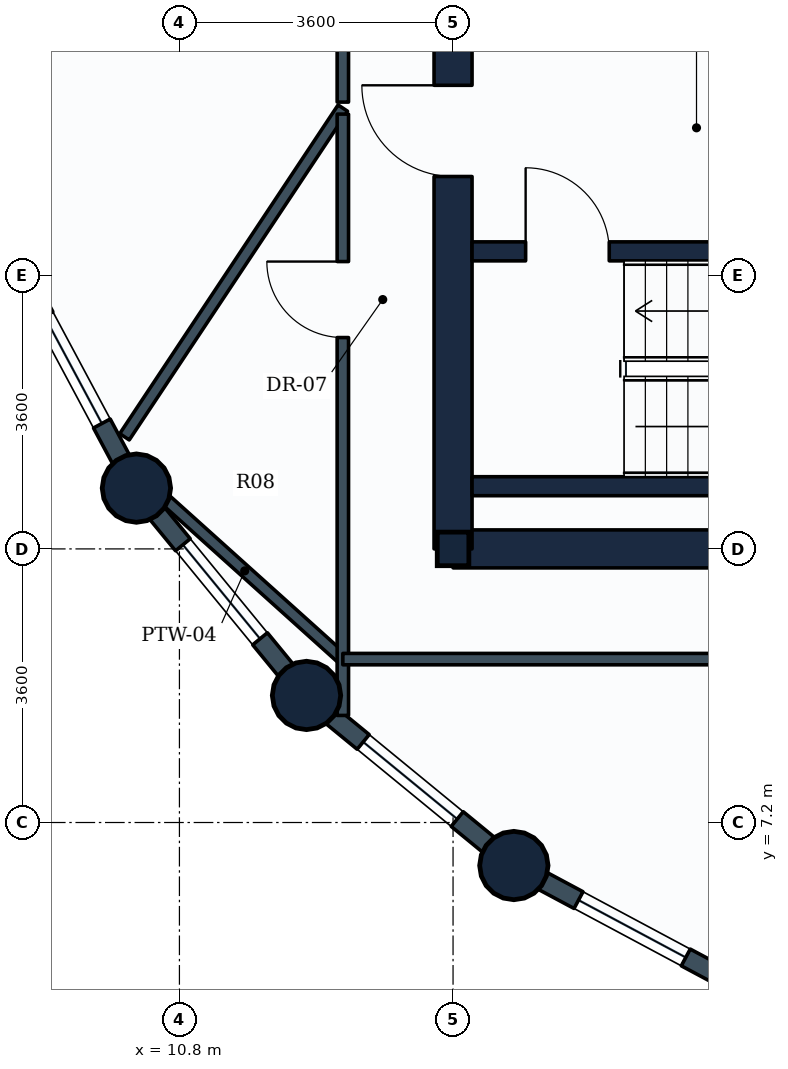
"""IFC4 building model, lengths in metres.
Left out: names, types, materials, properties, quantities, classifications, styles, units other than length and angle.
Written with IfcOpenShell. Run it as: python <this file> out.ifc"""

import sys

from ifc_helpers import new_model, si_unit, direction, frame, frame_2d, origin, origin_2d, place, context, subcontext, project, spatial, rectangle, circle, i_section, extrude, element, fill, save


model = new_model("IFC4")
c1 = context("Model", 3, precision=1e-05, world=origin(), true_north=direction((0.0, 1.0)))
c2 = subcontext(c1, "Body", "Model", "MODEL_VIEW")
j1 = project(units=[si_unit("LENGTHUNIT", "METRE"), si_unit("PLANEANGLEUNIT", "RADIAN")], contexts=[c1])
p1 = place(None, origin())
s1 = spatial("IfcSite", under=j1, at=p1, CompositionType="ELEMENT")
p2 = place(p1, origin())
s2 = spatial("IfcBuilding", under=s1, at=p2, CompositionType="ELEMENT")
p3 = place(p2, frame((0.0, 0.0, 201.4)))
s3 = spatial("IfcBuildingStorey", under=s2, at=p3, CompositionType="ELEMENT", Elevation=201.4)
for number, where, z_axis, x_axis in (
    (1, (10.234, 11.6, 0.0), (0.0, 0.0, 1.0), (1.0, 0.0, 0.0)),
    (2, (12.472, 8.872, 0.0), (0.0, 0.0, 1.0), (1.0, 0.0, 0.0)),
):
    element("IfcColumn", number, at=place(p3, frame(where, z_axis=z_axis, x_axis=x_axis)), inside=s3, PredefinedType="COLUMN", context=c2, shape_type="SweptSolid", body=[
        extrude(circle(Radius=0.45, at=origin_2d()), origin(), (0.0, 0.0, 1.0), 3.8),
    ])
p4 = place(p3, frame((14.4, 10.8, 0.0), z_axis=(0.0, 0.0, 1.0), x_axis=(1.0, 0.0, 0.0)))
e3 = element("IfcColumn", 3, at=p4, inside=s3, PredefinedType="COLUMN", context=c2, shape_type="SweptSolid", body=[
    extrude(i_section(OverallWidth=0.416, OverallDepth=0.442, WebThickness=0.025, FlangeThickness=0.041, FilletRadius=0.015, at=origin_2d()), origin(), (0.0, 0.0, 1.0), 3.8),
])
p5 = place(p3, frame((15.2, 6.634, 0.0), z_axis=(0.0, 0.0, 1.0), x_axis=(1.0, 0.0, 0.0)))
e4 = element("IfcColumn", 4, at=p5, inside=s3, PredefinedType="COLUMN", context=c2, shape_type="SweptSolid", body=[
    extrude(circle(Radius=0.45, at=origin_2d()), origin(), (0.0, 0.0, 1.0), 3.8),
])
p6 = place(p3, frame((10.234, 11.6, 0.0), z_axis=(0.0, 0.0, 1.0), x_axis=(-0.47151087309, 0.881860247748, 0.0)))
e5 = element("IfcWall", 5, at=p6, inside=s3, PredefinedType="STANDARD", context=c2, shape_type="SweptSolid", body=[
    extrude(rectangle(XDim=3.529, YDim=0.25, at=frame_2d((1.764, 0.0))), origin(), (0.0, 0.0, 1.0), 2.93),
])
p7 = place(p6, frame((0.964, 0.0, 0.85)))
e6 = element("IfcOpeningElement", 6, at=p7, cuts=e5, PredefinedType="OPENING", context=c2, shape_type="SweptSolid", body=[
    extrude(rectangle(XDim=1.6, YDim=1.35, at=frame_2d((0.8, 0.675))), frame((0.0, 0.135, 0.0), z_axis=(0.0, -1.0, 0.0), x_axis=(1.0, 0.0, 0.0)), (0.0, 0.0, 1.0), 0.27),
])
p8 = place(p3, frame((12.472, 8.872, 0.0), z_axis=(0.0, 0.0, 1.0), x_axis=(-0.634258295121, 0.773121216285, 0.0)))
e7 = element("IfcWall", 7, at=p8, inside=s3, PredefinedType="STANDARD", context=c2, shape_type="SweptSolid", body=[
    extrude(rectangle(XDim=3.529, YDim=0.25, at=frame_2d((1.764, 0.0))), origin(), (0.0, 0.0, 1.0), 2.93),
])
p9 = place(p8, frame((0.964, 0.0, 0.85)))
e8 = element("IfcOpeningElement", 8, at=p9, cuts=e7, PredefinedType="OPENING", context=c2, shape_type="SweptSolid", body=[
    extrude(rectangle(XDim=1.6, YDim=1.35, at=frame_2d((0.8, 0.675))), frame((0.0, 0.135, 0.0), z_axis=(0.0, -1.0, 0.0), x_axis=(1.0, 0.0, 0.0)), (0.0, 0.0, 1.0), 0.27),
])
p10 = place(p3, frame((15.2, 6.634, 0.0), z_axis=(0.0, 0.0, 1.0), x_axis=(-0.773121216285, 0.634258295121, 0.0)))
e9 = element("IfcWall", 9, at=p10, inside=s3, PredefinedType="STANDARD", context=c2, shape_type="SweptSolid", body=[
    extrude(rectangle(XDim=3.529, YDim=0.25, at=frame_2d((1.764, 0.0))), origin(), (0.0, 0.0, 1.0), 2.93),
])
p11 = place(p10, frame((0.964, 0.0, 0.85)))
e10 = element("IfcOpeningElement", 10, at=p11, cuts=e9, PredefinedType="OPENING", context=c2, shape_type="SweptSolid", body=[
    extrude(rectangle(XDim=1.6, YDim=1.35, at=frame_2d((0.8, 0.675))), frame((0.0, 0.135, 0.0), z_axis=(0.0, -1.0, 0.0), x_axis=(1.0, 0.0, 0.0)), (0.0, 0.0, 1.0), 0.27),
])
p12 = place(p3, frame((18.312, 4.97, 0.0), z_axis=(0.0, 0.0, 1.0), x_axis=(-0.881846862014, 0.471535907389, 0.0)))
e11 = element("IfcWall", 11, at=p12, inside=s3, PredefinedType="STANDARD", context=c2, shape_type="SweptSolid", body=[
    extrude(rectangle(XDim=3.529, YDim=0.25, at=frame_2d((1.765, 0.0))), origin(), (0.0, 0.0, 1.0), 2.93),
])
p13 = place(p12, frame((0.964, 0.0, 0.85)))
e12 = element("IfcOpeningElement", 12, at=p13, cuts=e11, PredefinedType="OPENING", context=c2, shape_type="SweptSolid", body=[
    extrude(rectangle(XDim=1.6, YDim=1.35, at=frame_2d((0.8, 0.675))), frame((0.0, 0.135, 0.0), z_axis=(0.0, -1.0, 0.0), x_axis=(1.0, 0.0, 0.0)), (0.0, 0.0, 1.0), 0.27),
])
p14 = place(p3, frame((14.4, 10.8, 0.0), z_axis=(0.0, 0.0, 1.0), x_axis=(1.0, 0.0, 0.0)))
e13 = element("IfcWall", 13, at=p14, inside=s3, PredefinedType="SHEAR", context=c2, shape_type="SweptSolid", body=[
    extrude(rectangle(XDim=18.0, YDim=0.5, at=frame_2d((9.0, 0.0))), origin(), (0.0, 0.0, 1.0), 3.55),
])
p15 = place(p3, frame((14.4, 10.8, 0.0), z_axis=(0.0, 0.0, 1.0), x_axis=(0.0, 1.0, 0.0)))
e14 = element("IfcWall", 14, at=p15, inside=s3, PredefinedType="SHEAR", context=c2, shape_type="SweptSolid", body=[
    extrude(rectangle(XDim=14.4, YDim=0.5, at=frame_2d((7.2, 0.0))), origin(), (0.0, 0.0, 1.0), 3.55),
])
p16 = place(p15, frame((11.05, 0.0, 0.0)))
e15 = element("IfcOpeningElement", 15, at=p16, cuts=e14, PredefinedType="OPENING", context=c2, shape_type="SweptSolid", body=[
    extrude(rectangle(XDim=1.1, YDim=2.1, at=frame_2d((0.55, 1.05))), frame((0.0, 0.26, 0.0), z_axis=(0.0, -1.0, 0.0), x_axis=(1.0, 0.0, 0.0)), (0.0, 0.0, 1.0), 0.52),
])
p17 = place(p15, frame((4.9, 0.0, 0.0)))
e16 = element("IfcOpeningElement", 16, at=p17, cuts=e14, PredefinedType="OPENING", context=c2, shape_type="SweptSolid", body=[
    extrude(rectangle(XDim=1.2, YDim=2.1, at=frame_2d((0.6, 1.05))), frame((0.0, 0.26, 0.0), z_axis=(0.0, -1.0, 0.0), x_axis=(1.0, 0.0, 0.0)), (0.0, 0.0, 1.0), 0.52),
])
p18 = place(p3, frame((14.65, 11.625, 0.0), z_axis=(0.0, 0.0, 1.0), x_axis=(1.0, 0.0, 0.0)))
e17 = element("IfcWall", 17, at=p18, inside=s3, PredefinedType="SHEAR", context=c2, shape_type="SweptSolid", body=[
    extrude(rectangle(XDim=8.7, YDim=0.25, at=frame_2d((4.35, 0.0))), origin(), (0.0, 0.0, 1.0), 3.55),
])
p19 = place(p3, frame((14.65, 14.715, 0.0), z_axis=(0.0, 0.0, 1.0), x_axis=(1.0, 0.0, 0.0)))
e18 = element("IfcWall", 18, at=p19, inside=s3, PredefinedType="SHEAR", context=c2, shape_type="SweptSolid", body=[
    extrude(rectangle(XDim=8.7, YDim=0.25, at=frame_2d((4.35, 0.0))), origin(), (0.0, 0.0, 1.0), 3.55),
])
p20 = place(p19, frame((0.705, 0.0, 0.0)))
e19 = element("IfcOpeningElement", 19, at=p20, cuts=e18, PredefinedType="OPENING", context=c2, shape_type="SweptSolid", body=[
    extrude(rectangle(XDim=1.1, YDim=2.1, at=frame_2d((0.55, 1.05))), frame((0.0, 0.135, 0.0), z_axis=(0.0, -1.0, 0.0), x_axis=(1.0, 0.0, 0.0)), (0.0, 0.0, 1.0), 0.27),
])
p21 = place(p3, frame((12.95, 9.35, 0.0), z_axis=(0.0, 0.0, 1.0), x_axis=(-0.74362269849, 0.668599493187, 0.0)))
e20 = element("IfcWall", 20, at=p21, inside=s3, PredefinedType="PARTITIONING", context=c2, shape_type="SweptSolid", body=[
    extrude(rectangle(XDim=3.472, YDim=0.15, at=frame_2d((1.736, 0.0))), origin(), (0.0, 0.0, 1.0), 2.93),
])
p22 = place(p3, frame((12.95, 16.6, 0.0), z_axis=(0.0, 0.0, 1.0), x_axis=(-0.553277952429, -0.832996703088, 0.0)))
e21 = element("IfcWall", 21, at=p22, inside=s3, PredefinedType="PARTITIONING", context=c2, shape_type="SweptSolid", body=[
    extrude(rectangle(XDim=5.192, YDim=0.15, at=frame_2d((2.596, 0.0))), origin(), (0.0, 0.0, 1.0), 2.93),
])
p23 = place(p3, frame((12.95, 16.679, 0.0), z_axis=(0.0, 0.0, 1.0), x_axis=(0.0, 1.0, 0.0)))
e22 = element("IfcWall", 22, at=p23, inside=s3, PredefinedType="PARTITIONING", context=c2, shape_type="SweptSolid", body=[
    extrude(rectangle(XDim=8.442, YDim=0.15, at=frame_2d((4.221, 0.0))), origin(), (0.0, 0.0, 1.0), 3.22),
])
p24 = place(p23, frame((3.721, 0.0, 0.0)))
e23 = element("IfcOpeningElement", 23, at=p24, cuts=e22, PredefinedType="OPENING", context=c2, shape_type="SweptSolid", body=[
    extrude(rectangle(XDim=1.0, YDim=2.1, at=frame_2d((0.5, 1.05))), frame((0.0, 0.085, 0.0), z_axis=(0.0, -1.0, 0.0), x_axis=(1.0, 0.0, 0.0)), (0.0, 0.0, 1.0), 0.17),
])
p25 = place(p3, frame((12.95, 8.609, 0.0), z_axis=(0.0, 0.0, 1.0), x_axis=(0.0, 1.0, 0.0)))
e24 = element("IfcWall", 24, at=p25, inside=s3, PredefinedType="PARTITIONING", context=c2, shape_type="SweptSolid", body=[
    extrude(rectangle(XDim=7.912, YDim=0.15, at=frame_2d((3.956, 0.0))), origin(), (0.0, 0.0, 1.0), 2.93),
])
p26 = place(p25, frame((4.972, 0.0, 0.0)))
e25 = element("IfcOpeningElement", 25, at=p26, cuts=e24, PredefinedType="OPENING", context=c2, shape_type="SweptSolid", body=[
    extrude(rectangle(XDim=1.0, YDim=2.1, at=frame_2d((0.5, 1.05))), frame((0.0, 0.085, 0.0), z_axis=(0.0, -1.0, 0.0), x_axis=(1.0, 0.0, 0.0)), (0.0, 0.0, 1.0), 0.17),
])
p27 = place(p3, frame((12.95, 9.35, 0.0), z_axis=(0.0, 0.0, 1.0), x_axis=(1.0, 0.0, 0.0)))
e26 = element("IfcWall", 26, at=p27, inside=s3, PredefinedType="PARTITIONING", context=c2, shape_type="SweptSolid", body=[
    extrude(rectangle(XDim=15.771, YDim=0.15, at=frame_2d((7.885, 0.0))), origin(), (0.0, 0.0, 1.0), 3.17),
])
p28 = place(p27, frame((4.836, 0.0, 0.0)))
e27 = element("IfcOpeningElement", 27, at=p28, cuts=e26, PredefinedType="OPENING", context=c2, shape_type="SweptSolid", body=[
    extrude(rectangle(XDim=1.0, YDim=2.1, at=frame_2d((0.5, 1.05))), frame((0.0, 0.085, 0.0), z_axis=(0.0, -1.0, 0.0), x_axis=(1.0, 0.0, 0.0)), (0.0, 0.0, 1.0), 0.17),
])
p29 = place(p7, origin())
e28 = element("IfcWindow", 28, at=p29, inside=s3, PartitioningType="SINGLE_PANEL", PredefinedType="WINDOW", context=c2, shape_type="SweptSolid", body=[
    extrude(rectangle(XDim=1.6, YDim=1.35, at=frame_2d((0.8, 0.675))), frame((0.0, 0.03, 0.0), z_axis=(0.0, -1.0, 0.0), x_axis=(1.0, 0.0, 0.0)), (0.0, 0.0, 1.0), 0.06),
])
fill(e6, e28)
p30 = place(p9, origin())
e29 = element("IfcWindow", 29, at=p30, inside=s3, PartitioningType="SINGLE_PANEL", PredefinedType="WINDOW", context=c2, shape_type="SweptSolid", body=[
    extrude(rectangle(XDim=1.6, YDim=1.35, at=frame_2d((0.8, 0.675))), frame((0.0, 0.03, 0.0), z_axis=(0.0, -1.0, 0.0), x_axis=(1.0, 0.0, 0.0)), (0.0, 0.0, 1.0), 0.06),
])
fill(e8, e29)
p31 = place(p11, origin())
e30 = element("IfcWindow", 30, at=p31, inside=s3, PartitioningType="SINGLE_PANEL", PredefinedType="WINDOW", context=c2, shape_type="SweptSolid", body=[
    extrude(rectangle(XDim=1.6, YDim=1.35, at=frame_2d((0.8, 0.675))), frame((0.0, 0.03, 0.0), z_axis=(0.0, -1.0, 0.0), x_axis=(1.0, 0.0, 0.0)), (0.0, 0.0, 1.0), 0.06),
])
fill(e10, e30)
p32 = place(p13, origin())
e31 = element("IfcWindow", 31, at=p32, inside=s3, PartitioningType="SINGLE_PANEL", PredefinedType="WINDOW", context=c2, shape_type="SweptSolid", body=[
    extrude(rectangle(XDim=1.6, YDim=1.35, at=frame_2d((0.8, 0.675))), frame((0.0, 0.03, 0.0), z_axis=(0.0, -1.0, 0.0), x_axis=(1.0, 0.0, 0.0)), (0.0, 0.0, 1.0), 0.06),
])
fill(e12, e31)
p33 = place(p20, origin())
e32 = element("IfcDoor", 32, at=p33, inside=s3, OperationType="SINGLE_SWING_LEFT", PredefinedType="DOOR", context=c2, shape_type="SweptSolid", body=[
    extrude(rectangle(XDim=1.1, YDim=2.1, at=frame_2d((0.55, 1.05))), frame((0.0, 0.025, 0.0), z_axis=(0.0, -1.0, 0.0), x_axis=(1.0, 0.0, 0.0)), (0.0, 0.0, 1.0), 0.05),
])
fill(e19, e32)
p34 = place(p17, origin())
e33 = element("IfcDoor", 33, at=p34, inside=s3, OperationType="SINGLE_SWING_RIGHT", PredefinedType="DOOR", context=c2, shape_type="SweptSolid", body=[
    extrude(rectangle(XDim=1.2, YDim=2.1, at=frame_2d((0.6, 1.05))), frame((0.0, 0.025, 0.0), z_axis=(0.0, -1.0, 0.0), x_axis=(1.0, 0.0, 0.0)), (0.0, 0.0, 1.0), 0.05),
])
fill(e16, e33)
p35 = place(p26, origin())
e34 = element("IfcDoor", 34, at=p35, inside=s3, OperationType="SINGLE_SWING_RIGHT", PredefinedType="DOOR", context=c2, shape_type="SweptSolid", body=[
    extrude(rectangle(XDim=1.0, YDim=2.1, at=frame_2d((0.5, 1.05))), frame((0.0, 0.025, 0.0), z_axis=(0.0, -1.0, 0.0), x_axis=(1.0, 0.0, 0.0)), (0.0, 0.0, 1.0), 0.05),
])
fill(e25, e34)
save(model, sys.argv[1])
